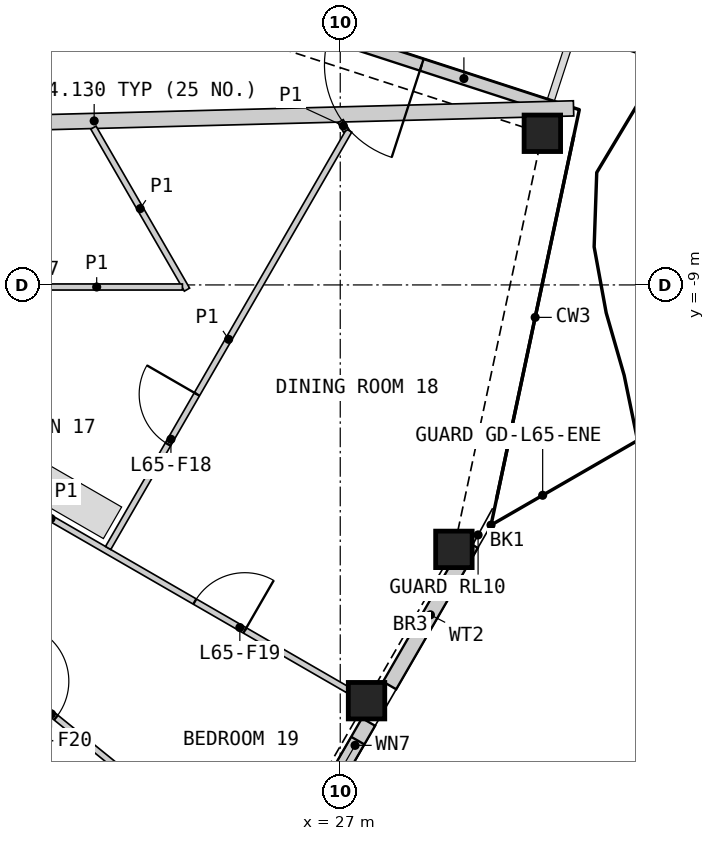
"""IFC4 building model, lengths in metres.
Left out: names, types, materials, properties, quantities, classifications, styles, units other than length and angle.
Written with IfcOpenShell. Run it as: python <this file> out.ifc"""

import sys

from ifc_helpers import new_model, si_unit, direction, frame, frame_2d, origin, origin_2d, place, context, subcontext, project, spatial, rectangle, hollow_rectangle, extrude, element, fill, save


model = new_model("IFC4")
c1 = context("Model", 3, precision=1e-05, world=origin(), true_north=direction((0.0, 1.0)))
c2 = subcontext(c1, "Body", "Model", "MODEL_VIEW")
j1 = project(units=[si_unit("LENGTHUNIT", "METRE"), si_unit("PLANEANGLEUNIT", "RADIAN")], contexts=[c1])
p1 = place(None, origin())
s1 = spatial("IfcSite", under=j1, at=p1, CompositionType="ELEMENT")
p2 = place(p1, origin())
s2 = spatial("IfcBuilding", under=s1, at=p2, CompositionType="ELEMENT")
p3 = place(p2, frame((0.0, 0.0, 301.8)))
s3 = spatial("IfcBuildingStorey", under=s2, at=p3, CompositionType="ELEMENT", Elevation=301.8)
for number, where, z_axis, x_axis in (
    (1, (27.432, -15.838, 0.0), (0.0, 0.0, 1.0), (1.0, 0.0, 0.0)),
    (2, (28.869, -13.349, 0.0), (0.0, 0.0, 1.0), (1.0, 0.0, 0.0)),
    (3, (30.324, -6.506, 0.0), (0.0, 0.0, 1.0), (1.0, 0.0, 0.0)),
):
    element("IfcColumn", number, at=place(p3, frame(where, z_axis=z_axis, x_axis=x_axis)), inside=s3, PredefinedType="COLUMN", context=c2, shape_type="SweptSolid", body=[
        extrude(hollow_rectangle(XDim=0.6, YDim=0.6, WallThickness=0.04, at=origin_2d()), origin(), (0.0, 0.0, 1.0), 3.4),
    ])
p4 = place(p3, frame((26.063, -18.617, 0.0), z_axis=(0.0, 0.0, 1.0), x_axis=(0.499968627931, 0.866043515699, 0.0)))
e4 = element("IfcWall", 4, at=p4, inside=s3, PredefinedType="SOLIDWALL", context=c2, shape_type="SweptSolid", body=[
    extrude(rectangle(XDim=2.804, YDim=0.25, at=frame_2d((1.402, 0.0))), origin(), (0.0, 0.0, 1.0), 2.488),
])
p5 = place(p4, frame((1.55, 0.0, 1.6)))
e5 = element("IfcOpeningElement", 5, at=p5, cuts=e4, PredefinedType="OPENING", context=c2, shape_type="SweptSolid", body=[
    extrude(rectangle(XDim=0.9, YDim=0.6, at=frame_2d((0.45, 0.3))), frame((0.0, 0.135, 0.0), z_axis=(0.0, -1.0, 0.0), x_axis=(1.0, 0.0, 0.0)), (0.0, 0.0, 1.0), 0.27),
])
p6 = place(p3, frame((27.812, -15.588, 0.0), z_axis=(0.0, 0.0, 1.0), x_axis=(0.500032109083, 0.866006864803, 0.0)))
e6 = element("IfcWall", 6, at=p6, inside=s3, PredefinedType="SOLIDWALL", context=c2, shape_type="SweptSolid", body=[
    extrude(rectangle(XDim=2.684, YDim=0.25, at=frame_2d((1.342, 0.0))), origin(), (0.0, 0.0, 1.0), 2.488),
])
p7 = place(p3, frame((30.488, -6.078, 0.0), z_axis=(0.0, 0.0, 1.0), x_axis=(-0.951062515241, 0.308998530908, 0.0)))
e7 = element("IfcWall", 7, at=p7, inside=s3, PredefinedType="SOLIDWALL", context=c2, shape_type="SweptSolid", body=[
    extrude(rectangle(XDim=6.117, YDim=0.2, at=frame_2d((3.059, 0.0))), origin(), (0.0, 0.0, 1.0), 2.488),
])
p8 = place(p7, frame((2.259, 0.0, 0.0)))
e8 = element("IfcOpeningElement", 8, at=p8, cuts=e7, PredefinedType="OPENING", context=c2, shape_type="SweptSolid", body=[
    extrude(rectangle(XDim=1.6, YDim=2.25, at=frame_2d((0.8, 1.125))), frame((0.0, 0.11, 0.0), z_axis=(0.0, -1.0, 0.0), x_axis=(1.0, 0.0, 0.0)), (0.0, 0.0, 1.0), 0.22),
])
p9 = place(p3, frame((15.069, -6.509, 0.0), z_axis=(0.0, 0.0, 1.0), x_axis=(0.999657828615, 0.026157708023, 0.0)))
e9 = element("IfcWall", 9, at=p9, inside=s3, PredefinedType="PARTITIONING", context=c2, shape_type="SweptSolid", body=[
    extrude(rectangle(XDim=15.773, YDim=0.25, at=frame_2d((7.887, 0.0))), origin(), (0.0, 0.0, 1.0), 2.33),
])
p10 = place(p3, frame((15.848, -10.871, 0.0), z_axis=(0.0, 0.0, 1.0), x_axis=(0.77713687197, -0.629331615465, 0.0)))
e10 = element("IfcWall", 10, at=p10, inside=s3, PredefinedType="PARTITIONING", context=c2, shape_type="SweptSolid", body=[
    extrude(rectangle(XDim=13.004, YDim=0.1, at=frame_2d((6.502, 0.0))), origin(), (0.0, 0.0, 1.0), 2.33),
])
p11 = place(p10, frame((7.384, 0.0, 0.0)))
e11 = element("IfcOpeningElement", 11, at=p11, cuts=e10, PredefinedType="OPENING", context=c2, shape_type="SweptSolid", body=[
    extrude(rectangle(XDim=0.95, YDim=2.1, at=frame_2d((0.475, 1.05))), frame((0.0, 0.06, 0.0), z_axis=(0.0, -1.0, 0.0), x_axis=(1.0, 0.0, 0.0)), (0.0, 0.0, 1.0), 0.12),
])
p12 = place(p3, frame((17.365, -10.025, 0.0), z_axis=(0.0, 0.0, 1.0), x_axis=(0.866021046153, -0.500007547564, 0.0)))
e12 = element("IfcWall", 12, at=p12, inside=s3, PredefinedType="PARTITIONING", context=c2, shape_type="SweptSolid", body=[
    extrude(rectangle(XDim=11.267, YDim=0.1, at=frame_2d((5.634, 0.0))), origin(), (0.0, 0.0, 1.0), 2.33),
])
p13 = place(p12, frame((8.364, 0.0, 0.0)))
e13 = element("IfcOpeningElement", 13, at=p13, cuts=e12, PredefinedType="OPENING", context=c2, shape_type="SweptSolid", body=[
    extrude(rectangle(XDim=0.95, YDim=2.1, at=frame_2d((0.475, 1.05))), frame((0.0, 0.06, 0.0), z_axis=(0.0, -1.0, 0.0), x_axis=(1.0, 0.0, 0.0)), (0.0, 0.0, 1.0), 0.12),
])
p14 = place(p3, frame((23.183, -13.327, 0.0), z_axis=(0.0, 0.0, 1.0), x_axis=(0.499991741039, 0.866030172045, 0.0)))
e14 = element("IfcWall", 14, at=p14, inside=s3, PredefinedType="PARTITIONING", context=c2, shape_type="SweptSolid", body=[
    extrude(rectangle(XDim=7.927, YDim=0.1, at=frame_2d((3.963, 0.0))), origin(), (0.0, 0.0, 1.0), 2.33),
])
p15 = place(p14, frame((1.97, 0.0, 0.0)))
e15 = element("IfcOpeningElement", 15, at=p15, cuts=e14, PredefinedType="OPENING", context=c2, shape_type="SweptSolid", body=[
    extrude(rectangle(XDim=0.95, YDim=2.1, at=frame_2d((0.475, 1.05))), frame((0.0, 0.06, 0.0), z_axis=(0.0, -1.0, 0.0), x_axis=(1.0, 0.0, 0.0)), (0.0, 0.0, 1.0), 0.12),
])
p16 = place(p3, frame((22.941, -6.413, 0.0), z_axis=(0.0, 0.0, 1.0), x_axis=(0.500013199183, -0.866017783098, 0.0)))
e16 = element("IfcWall", 16, at=p16, inside=s3, PredefinedType="PARTITIONING", context=c2, shape_type="SweptSolid", body=[
    extrude(rectangle(XDim=3.077, YDim=0.1, at=frame_2d((1.539, 0.0))), origin(), (0.0, 0.0, 1.0), 2.33),
])
p17 = place(p3, frame((21.584, -9.034, 0.0), z_axis=(0.0, 0.0, 1.0), x_axis=(1.0, 0.0, 0.0)))
e17 = element("IfcWall", 17, at=p17, inside=s3, PredefinedType="PARTITIONING", context=c2, shape_type="SweptSolid", body=[
    extrude(rectangle(XDim=2.82, YDim=0.1, at=frame_2d((1.41, 0.0))), origin(), (0.0, 0.0, 1.0), 2.33),
])
p18 = place(p3, frame((27.006, -6.306, 0.0), z_axis=(0.0, 0.0, 1.0), x_axis=(0.500074377092, -0.865982457891, 0.0)))
e18 = element("IfcWall", 18, at=p18, inside=s3, PredefinedType="PARTITIONING", context=c2, shape_type="SweptSolid", body=[
    extrude(rectangle(XDim=0.18, YDim=0.1, at=frame_2d((0.09, 0.0))), origin(), (0.0, 0.0, 1.0), 2.33),
])
p19 = place(p5, origin())
e19 = element("IfcWindow", 19, at=p19, inside=s3, PartitioningType="SINGLE_PANEL", PredefinedType="WINDOW", context=c2, shape_type="SweptSolid", body=[
    extrude(rectangle(XDim=0.9, YDim=0.6, at=frame_2d((0.45, 0.3))), frame((0.0, 0.03, 0.0), z_axis=(0.0, -1.0, 0.0), x_axis=(1.0, 0.0, 0.0)), (0.0, 0.0, 1.0), 0.06),
])
fill(e5, e19)
p20 = place(p8, origin())
e20 = element("IfcDoor", 20, at=p20, inside=s3, OperationType="DOUBLE_DOOR_SINGLE_SWING", PredefinedType="DOOR", context=c2, shape_type="SweptSolid", body=[
    extrude(rectangle(XDim=1.6, YDim=2.25, at=frame_2d((0.8, 1.125))), frame((0.0, 0.025, 0.0), z_axis=(0.0, -1.0, 0.0), x_axis=(1.0, 0.0, 0.0)), (0.0, 0.0, 1.0), 0.05),
])
fill(e8, e20)
p21 = place(p15, origin())
e21 = element("IfcDoor", 21, at=p21, inside=s3, OperationType="SINGLE_SWING_RIGHT", PredefinedType="DOOR", context=c2, shape_type="SweptSolid", body=[
    extrude(rectangle(XDim=0.95, YDim=2.1, at=frame_2d((0.475, 1.05))), frame((0.0, 0.025, 0.0), z_axis=(0.0, -1.0, 0.0), x_axis=(1.0, 0.0, 0.0)), (0.0, 0.0, 1.0), 0.05),
])
fill(e15, e21)
p22 = place(p13, origin())
e22 = element("IfcDoor", 22, at=p22, inside=s3, OperationType="SINGLE_SWING_RIGHT", PredefinedType="DOOR", context=c2, shape_type="SweptSolid", body=[
    extrude(rectangle(XDim=0.95, YDim=2.1, at=frame_2d((0.475, 1.05))), frame((0.0, 0.025, 0.0), z_axis=(0.0, -1.0, 0.0), x_axis=(1.0, 0.0, 0.0)), (0.0, 0.0, 1.0), 0.05),
])
fill(e13, e22)
p23 = place(p11, origin())
e23 = element("IfcDoor", 23, at=p23, inside=s3, OperationType="SINGLE_SWING_LEFT", PredefinedType="DOOR", context=c2, shape_type="SweptSolid", body=[
    extrude(rectangle(XDim=0.95, YDim=2.1, at=frame_2d((0.475, 1.05))), frame((0.0, 0.025, 0.0), z_axis=(0.0, -1.0, 0.0), x_axis=(1.0, 0.0, 0.0)), (0.0, 0.0, 1.0), 0.05),
])
fill(e11, e23)
save(model, sys.argv[1])
